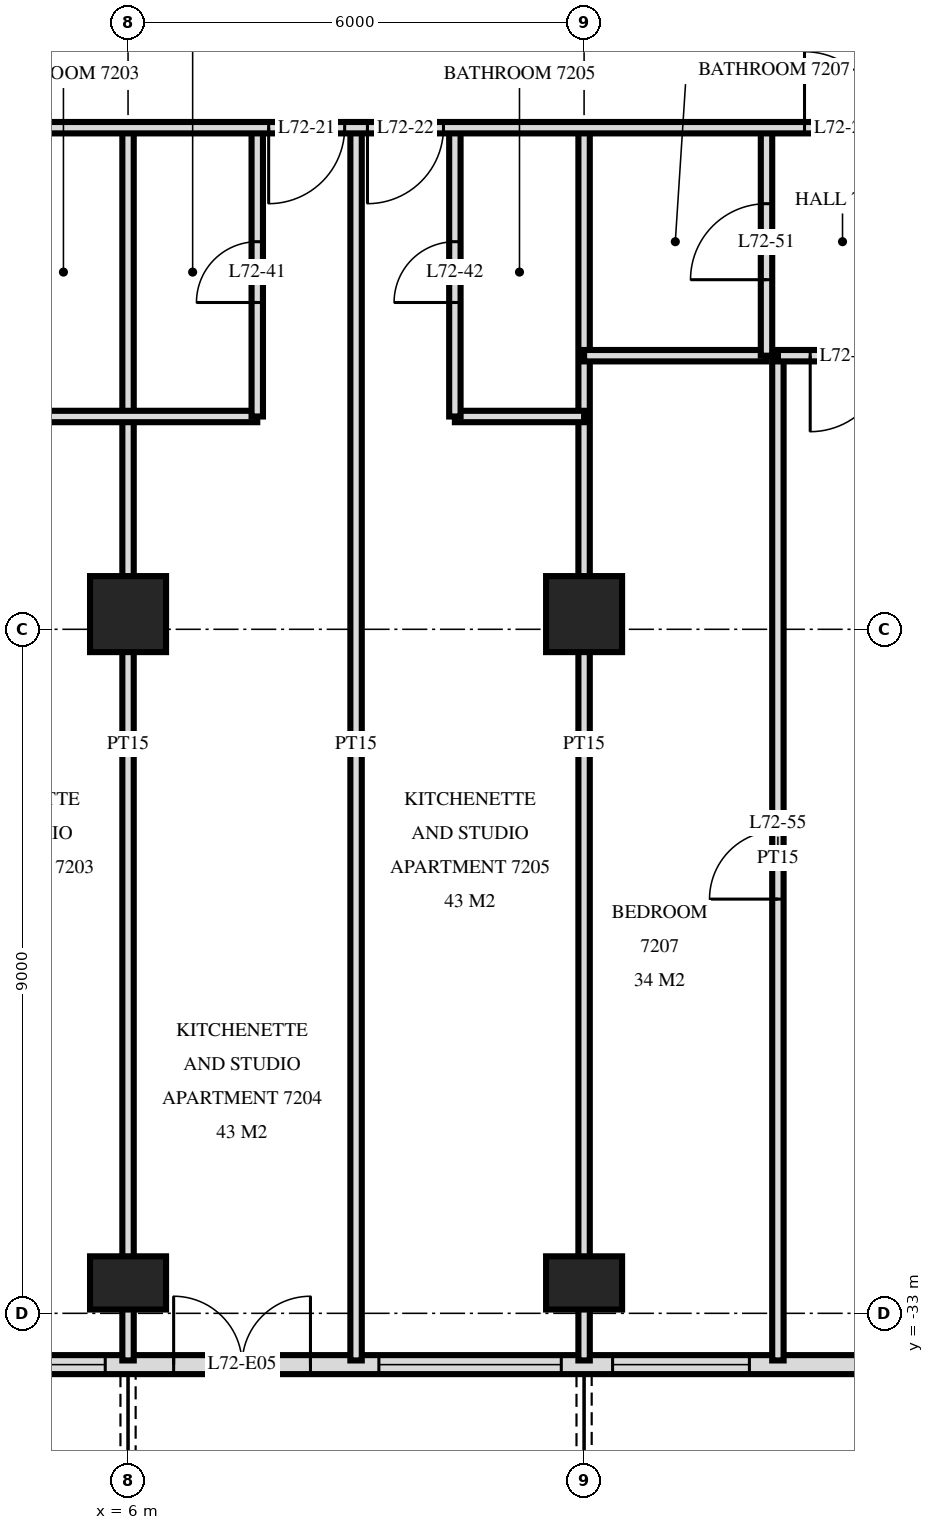
"""IFC4 building model, lengths in metres.
Left out: names, types, materials, properties, quantities, classifications, styles, units other than length and angle.
Written with IfcOpenShell. Run it as: python <this file> out.ifc"""

import sys

from ifc_helpers import new_model, si_unit, direction, frame, frame_2d, origin, origin_2d, place, context, subcontext, project, spatial, rectangle, extrude, element, fill, save


model = new_model("IFC4")
c1 = context("Model", 3, precision=1e-05, world=origin(), true_north=direction((0.0, 1.0)))
c2 = subcontext(c1, "Body", "Model", "MODEL_VIEW")
j1 = project(units=[si_unit("LENGTHUNIT", "METRE"), si_unit("PLANEANGLEUNIT", "RADIAN")], contexts=[c1])
p1 = place(None, origin())
s1 = spatial("IfcSite", under=j1, at=p1, CompositionType="ELEMENT")
p2 = place(p1, origin())
s2 = spatial("IfcBuilding", under=s1, at=p2, CompositionType="ELEMENT")
p3 = place(p2, frame((0.0, 0.0, 273.6)))
s3 = spatial("IfcBuildingStorey", under=s2, at=p3, CompositionType="ELEMENT", Elevation=273.6)
p4 = place(p3, frame((6.0, -32.6, 0.0), z_axis=(0.0, 0.0, 1.0), x_axis=(1.0, 0.0, 0.0)))
e1 = element("IfcColumn", 1, at=p4, inside=s3, PredefinedType="COLUMN", context=c2, shape_type="SweptSolid", body=[
    extrude(rectangle(XDim=1.0, YDim=0.7, at=origin_2d()), origin(), (0.0, 0.0, 1.0), 3.5),
])
p5 = place(p3, frame((6.0, -23.8, 0.0), z_axis=(0.0, 0.0, 1.0), x_axis=(1.0, 0.0, 0.0)))
e2 = element("IfcColumn", 2, at=p5, inside=s3, PredefinedType="COLUMN", context=c2, shape_type="SweptSolid", body=[
    extrude(rectangle(XDim=1.0, YDim=1.0, at=origin_2d()), origin(), (0.0, 0.0, 1.0), 3.5),
])
p6 = place(p3, frame((12.0, -32.6, 0.0), z_axis=(0.0, 0.0, 1.0), x_axis=(1.0, 0.0, 0.0)))
e3 = element("IfcColumn", 3, at=p6, inside=s3, PredefinedType="COLUMN", context=c2, shape_type="SweptSolid", body=[
    extrude(rectangle(XDim=1.0, YDim=0.7, at=origin_2d()), origin(), (0.0, 0.0, 1.0), 3.5),
])
p7 = place(p3, frame((12.0, -23.8, 0.0), z_axis=(0.0, 0.0, 1.0), x_axis=(1.0, 0.0, 0.0)))
e4 = element("IfcColumn", 4, at=p7, inside=s3, PredefinedType="COLUMN", context=c2, shape_type="SweptSolid", body=[
    extrude(rectangle(XDim=1.0, YDim=1.0, at=origin_2d()), origin(), (0.0, 0.0, 1.0), 3.5),
])
p8 = place(p3, frame((-18.575, -33.675, 0.0), z_axis=(0.0, 0.0, 1.0), x_axis=(1.0, 0.0, 0.0)))
e5 = element("IfcWall", 5, at=p8, inside=s3, PredefinedType="SOLIDWALL", context=c2, shape_type="SweptSolid", body=[
    extrude(rectangle(XDim=37.151, YDim=0.25, at=frame_2d((18.575, 0.0))), origin(), (0.0, 0.0, 1.0), 3.22),
])
p9 = place(p8, frame((4.175, 0.0, 0.0)))
e6 = element("IfcOpeningElement", 6, at=p9, cuts=e5, PredefinedType="OPENING", context=c2, shape_type="SweptSolid", body=[
    extrude(rectangle(XDim=1.8, YDim=2.4, at=frame_2d((0.9, 1.2))), frame((0.0, 0.135, 0.0), z_axis=(0.0, -1.0, 0.0), x_axis=(1.0, 0.0, 0.0)), (0.0, 0.0, 1.0), 0.27),
])
p10 = place(p8, frame((7.512, 0.0, 0.0)))
e7 = element("IfcOpeningElement", 7, at=p10, cuts=e5, PredefinedType="OPENING", context=c2, shape_type="SweptSolid", body=[
    extrude(rectangle(XDim=1.8, YDim=2.4, at=frame_2d((0.9, 1.2))), frame((0.0, 0.135, 0.0), z_axis=(0.0, -1.0, 0.0), x_axis=(1.0, 0.0, 0.0)), (0.0, 0.0, 1.0), 0.27),
])
p11 = place(p8, frame((10.287, 0.0, 0.9)))
e8 = element("IfcOpeningElement", 8, at=p11, cuts=e5, PredefinedType="OPENING", context=c2, shape_type="SweptSolid", body=[
    extrude(rectangle(XDim=1.8, YDim=1.5, at=frame_2d((0.9, 0.75))), frame((0.0, 0.135, 0.0), z_axis=(0.0, -1.0, 0.0), x_axis=(1.0, 0.0, 0.0)), (0.0, 0.0, 1.0), 0.27),
])
p12 = place(p8, frame((12.875, 0.0, 0.9)))
e9 = element("IfcOpeningElement", 9, at=p12, cuts=e5, PredefinedType="OPENING", context=c2, shape_type="SweptSolid", body=[
    extrude(rectangle(XDim=2.4, YDim=1.5, at=frame_2d((1.2, 0.75))), frame((0.0, 0.135, 0.0), z_axis=(0.0, -1.0, 0.0), x_axis=(1.0, 0.0, 0.0)), (0.0, 0.0, 1.0), 0.27),
])
p13 = place(p8, frame((16.175, 0.0, 0.0)))
e10 = element("IfcOpeningElement", 10, at=p13, cuts=e5, PredefinedType="OPENING", context=c2, shape_type="SweptSolid", body=[
    extrude(rectangle(XDim=1.8, YDim=2.4, at=frame_2d((0.9, 1.2))), frame((0.0, 0.135, 0.0), z_axis=(0.0, -1.0, 0.0), x_axis=(1.0, 0.0, 0.0)), (0.0, 0.0, 1.0), 0.27),
])
p14 = place(p8, frame((19.175, 0.0, 0.0)))
e11 = element("IfcOpeningElement", 11, at=p14, cuts=e5, PredefinedType="OPENING", context=c2, shape_type="SweptSolid", body=[
    extrude(rectangle(XDim=1.8, YDim=2.4, at=frame_2d((0.9, 1.2))), frame((0.0, 0.135, 0.0), z_axis=(0.0, -1.0, 0.0), x_axis=(1.0, 0.0, 0.0)), (0.0, 0.0, 1.0), 0.27),
])
p15 = place(p8, frame((21.875, 0.0, 0.9)))
e12 = element("IfcOpeningElement", 12, at=p15, cuts=e5, PredefinedType="OPENING", context=c2, shape_type="SweptSolid", body=[
    extrude(rectangle(XDim=2.4, YDim=1.5, at=frame_2d((1.2, 0.75))), frame((0.0, 0.135, 0.0), z_axis=(0.0, -1.0, 0.0), x_axis=(1.0, 0.0, 0.0)), (0.0, 0.0, 1.0), 0.27),
])
p16 = place(p8, frame((25.175, 0.0, 0.0)))
e13 = element("IfcOpeningElement", 13, at=p16, cuts=e5, PredefinedType="OPENING", context=c2, shape_type="SweptSolid", body=[
    extrude(rectangle(XDim=1.8, YDim=2.4, at=frame_2d((0.9, 1.2))), frame((0.0, 0.135, 0.0), z_axis=(0.0, -1.0, 0.0), x_axis=(1.0, 0.0, 0.0)), (0.0, 0.0, 1.0), 0.27),
])
p17 = place(p8, frame((27.875, 0.0, 0.9)))
e14 = element("IfcOpeningElement", 14, at=p17, cuts=e5, PredefinedType="OPENING", context=c2, shape_type="SweptSolid", body=[
    extrude(rectangle(XDim=2.4, YDim=1.5, at=frame_2d((1.2, 0.75))), frame((0.0, 0.135, 0.0), z_axis=(0.0, -1.0, 0.0), x_axis=(1.0, 0.0, 0.0)), (0.0, 0.0, 1.0), 0.27),
])
p18 = place(p8, frame((30.95, 0.0, 0.9)))
e15 = element("IfcOpeningElement", 15, at=p18, cuts=e5, PredefinedType="OPENING", context=c2, shape_type="SweptSolid", body=[
    extrude(rectangle(XDim=1.8, YDim=1.5, at=frame_2d((0.9, 0.75))), frame((0.0, 0.135, 0.0), z_axis=(0.0, -1.0, 0.0), x_axis=(1.0, 0.0, 0.0)), (0.0, 0.0, 1.0), 0.27),
])
p19 = place(p8, frame((34.175, 0.0, 0.0)))
e16 = element("IfcOpeningElement", 16, at=p19, cuts=e5, PredefinedType="OPENING", context=c2, shape_type="SweptSolid", body=[
    extrude(rectangle(XDim=1.8, YDim=2.4, at=frame_2d((0.9, 1.2))), frame((0.0, 0.135, 0.0), z_axis=(0.0, -1.0, 0.0), x_axis=(1.0, 0.0, 0.0)), (0.0, 0.0, 1.0), 0.27),
])
p20 = place(p3, frame((14.55, -33.62, 0.0), z_axis=(0.0, 0.0, 1.0), x_axis=(0.0, 1.0, 0.0)))
e17 = element("IfcWall", 17, at=p20, inside=s3, PredefinedType="PARTITIONING", context=c2, shape_type="SweptSolid", body=[
    extrude(rectangle(XDim=13.22, YDim=0.15, at=frame_2d((6.61, 0.0))), origin(), (0.0, 0.0, 1.0), 3.22),
])
p21 = place(p20, frame((6.07, 0.0, 0.0)))
e18 = element("IfcOpeningElement", 18, at=p21, cuts=e17, PredefinedType="OPENING", context=c2, shape_type="SweptSolid", body=[
    extrude(rectangle(XDim=0.9, YDim=2.1, at=frame_2d((0.45, 1.05))), frame((0.0, 0.085, 0.0), z_axis=(0.0, -1.0, 0.0), x_axis=(1.0, 0.0, 0.0)), (0.0, 0.0, 1.0), 0.17),
])
p22 = place(p3, frame((14.4, -20.4, 0.0), z_axis=(0.0, 0.0, 1.0), x_axis=(0.0, 1.0, 0.0)))
e19 = element("IfcWall", 19, at=p22, inside=s3, PredefinedType="PARTITIONING", context=c2, shape_type="SweptSolid", body=[
    extrude(rectangle(XDim=3.0, YDim=0.15, at=frame_2d((1.5, 0.0))), origin(), (0.0, 0.0, 1.0), 3.22),
])
p23 = place(p22, frame((1.0, 0.0, 0.0)))
e20 = element("IfcOpeningElement", 20, at=p23, cuts=e19, PredefinedType="OPENING", context=c2, shape_type="SweptSolid", body=[
    extrude(rectangle(XDim=1.0, YDim=2.1, at=frame_2d((0.5, 1.05))), frame((0.0, 0.085, 0.0), z_axis=(0.0, -1.0, 0.0), x_axis=(1.0, 0.0, 0.0)), (0.0, 0.0, 1.0), 0.17),
])
p24 = place(p3, frame((12.0, -33.62, 0.0), z_axis=(0.0, 0.0, 1.0), x_axis=(0.0, 1.0, 0.0)))
e21 = element("IfcWall", 21, at=p24, inside=s3, PredefinedType="PARTITIONING", context=c2, shape_type="SweptSolid", body=[
    extrude(rectangle(XDim=16.22, YDim=0.15, at=frame_2d((8.11, 0.0))), origin(), (0.0, 0.0, 1.0), 3.22),
])
p25 = place(p3, frame((10.3, -21.2, 0.0), z_axis=(0.0, 0.0, 1.0), x_axis=(0.0, 1.0, 0.0)))
e22 = element("IfcWall", 22, at=p25, inside=s3, PredefinedType="PARTITIONING", context=c2, shape_type="SweptSolid", body=[
    extrude(rectangle(XDim=3.8, YDim=0.15, at=frame_2d((1.9, 0.0))), origin(), (0.0, 0.0, 1.0), 3.22),
])
p26 = place(p25, frame((1.5, 0.0, 0.0)))
e23 = element("IfcOpeningElement", 23, at=p26, cuts=e22, PredefinedType="OPENING", context=c2, shape_type="SweptSolid", body=[
    extrude(rectangle(XDim=0.8, YDim=2.1, at=frame_2d((0.4, 1.05))), frame((0.0, 0.085, 0.0), z_axis=(0.0, -1.0, 0.0), x_axis=(1.0, 0.0, 0.0)), (0.0, 0.0, 1.0), 0.17),
])
p27 = place(p3, frame((9.0, -33.62, 0.0), z_axis=(0.0, 0.0, 1.0), x_axis=(0.0, 1.0, 0.0)))
e24 = element("IfcWall", 24, at=p27, inside=s3, PredefinedType="PARTITIONING", context=c2, shape_type="SweptSolid", body=[
    extrude(rectangle(XDim=16.22, YDim=0.15, at=frame_2d((8.11, 0.0))), origin(), (0.0, 0.0, 1.0), 3.22),
])
p28 = place(p3, frame((7.7, -21.2, 0.0), z_axis=(0.0, 0.0, 1.0), x_axis=(0.0, 1.0, 0.0)))
e25 = element("IfcWall", 25, at=p28, inside=s3, PredefinedType="PARTITIONING", context=c2, shape_type="SweptSolid", body=[
    extrude(rectangle(XDim=3.8, YDim=0.15, at=frame_2d((1.9, 0.0))), origin(), (0.0, 0.0, 1.0), 3.22),
])
p29 = place(p28, frame((1.5, 0.0, 0.0)))
e26 = element("IfcOpeningElement", 26, at=p29, cuts=e25, PredefinedType="OPENING", context=c2, shape_type="SweptSolid", body=[
    extrude(rectangle(XDim=0.8, YDim=2.1, at=frame_2d((0.4, 1.05))), frame((0.0, 0.085, 0.0), z_axis=(0.0, -1.0, 0.0), x_axis=(1.0, 0.0, 0.0)), (0.0, 0.0, 1.0), 0.17),
])
p30 = place(p3, frame((6.0, -33.62, 0.0), z_axis=(0.0, 0.0, 1.0), x_axis=(0.0, 1.0, 0.0)))
e27 = element("IfcWall", 27, at=p30, inside=s3, PredefinedType="PARTITIONING", context=c2, shape_type="SweptSolid", body=[
    extrude(rectangle(XDim=16.22, YDim=0.15, at=frame_2d((8.11, 0.0))), origin(), (0.0, 0.0, 1.0), 3.22),
])
p31 = place(p3, frame((4.3, -21.2, 0.0), z_axis=(0.0, 0.0, 1.0), x_axis=(1.0, 0.0, 0.0)))
e28 = element("IfcWall", 28, at=p31, inside=s3, PredefinedType="PARTITIONING", context=c2, shape_type="SweptSolid", body=[
    extrude(rectangle(XDim=3.4, YDim=0.15, at=frame_2d((1.7, 0.0))), origin(), (0.0, 0.0, 1.0), 3.22),
])
p32 = place(p3, frame((10.3, -21.2, 0.0), z_axis=(0.0, 0.0, 1.0), x_axis=(1.0, 0.0, 0.0)))
e29 = element("IfcWall", 29, at=p32, inside=s3, PredefinedType="PARTITIONING", context=c2, shape_type="SweptSolid", body=[
    extrude(rectangle(XDim=1.7, YDim=0.15, at=frame_2d((0.85, 0.0))), origin(), (0.0, 0.0, 1.0), 3.22),
])
p33 = place(p3, frame((14.55, -20.4, 0.0), z_axis=(0.0, 0.0, 1.0), x_axis=(1.0, 0.0, 0.0)))
e30 = element("IfcWall", 30, at=p33, inside=s3, PredefinedType="PARTITIONING", context=c2, shape_type="SweptSolid", body=[
    extrude(rectangle(XDim=1.85, YDim=0.15, at=frame_2d((0.925, 0.0))), origin(), (0.0, 0.0, 1.0), 3.22),
])
p34 = place(p33, frame((0.425, 0.0, 0.0)))
e31 = element("IfcOpeningElement", 31, at=p34, cuts=e30, PredefinedType="OPENING", context=c2, shape_type="SweptSolid", body=[
    extrude(rectangle(XDim=1.0, YDim=2.1, at=frame_2d((0.5, 1.05))), frame((0.0, 0.085, 0.0), z_axis=(0.0, -1.0, 0.0), x_axis=(1.0, 0.0, 0.0)), (0.0, 0.0, 1.0), 0.17),
])
p35 = place(p3, frame((12.0, -20.4, 0.0), z_axis=(0.0, 0.0, 1.0), x_axis=(1.0, 0.0, 0.0)))
e32 = element("IfcWall", 32, at=p35, inside=s3, PredefinedType="PARTITIONING", context=c2, shape_type="SweptSolid", body=[
    extrude(rectangle(XDim=2.4, YDim=0.15, at=frame_2d((1.2, 0.0))), origin(), (0.0, 0.0, 1.0), 3.22),
])
p36 = place(p3, frame((-22.92, -17.4, 0.0), z_axis=(0.0, 0.0, 1.0), x_axis=(1.0, 0.0, 0.0)))
e33 = element("IfcWall", 33, at=p36, inside=s3, PredefinedType="PARTITIONING", context=c2, shape_type="SweptSolid", body=[
    extrude(rectangle(XDim=45.84, YDim=0.15, at=frame_2d((22.92, 0.0))), origin(), (0.0, 0.0, 1.0), 3.22),
])
p37 = place(p36, frame((21.67, 0.0, 0.0)))
e34 = element("IfcOpeningElement", 34, at=p37, cuts=e33, PredefinedType="OPENING", context=c2, shape_type="SweptSolid", body=[
    extrude(rectangle(XDim=1.0, YDim=2.1, at=frame_2d((0.5, 1.05))), frame((0.0, 0.085, 0.0), z_axis=(0.0, -1.0, 0.0), x_axis=(1.0, 0.0, 0.0)), (0.0, 0.0, 1.0), 0.17),
])
p38 = place(p36, frame((24.77, 0.0, 0.0)))
e35 = element("IfcOpeningElement", 35, at=p38, cuts=e33, PredefinedType="OPENING", context=c2, shape_type="SweptSolid", body=[
    extrude(rectangle(XDim=1.0, YDim=2.1, at=frame_2d((0.5, 1.05))), frame((0.0, 0.085, 0.0), z_axis=(0.0, -1.0, 0.0), x_axis=(1.0, 0.0, 0.0)), (0.0, 0.0, 1.0), 0.17),
])
p39 = place(p36, frame((26.07, 0.0, 0.0)))
e36 = element("IfcOpeningElement", 36, at=p39, cuts=e33, PredefinedType="OPENING", context=c2, shape_type="SweptSolid", body=[
    extrude(rectangle(XDim=1.0, YDim=2.1, at=frame_2d((0.5, 1.05))), frame((0.0, 0.085, 0.0), z_axis=(0.0, -1.0, 0.0), x_axis=(1.0, 0.0, 0.0)), (0.0, 0.0, 1.0), 0.17),
])
p40 = place(p36, frame((30.77, 0.0, 0.0)))
e37 = element("IfcOpeningElement", 37, at=p40, cuts=e33, PredefinedType="OPENING", context=c2, shape_type="SweptSolid", body=[
    extrude(rectangle(XDim=1.0, YDim=2.1, at=frame_2d((0.5, 1.05))), frame((0.0, 0.085, 0.0), z_axis=(0.0, -1.0, 0.0), x_axis=(1.0, 0.0, 0.0)), (0.0, 0.0, 1.0), 0.17),
])
p41 = place(p36, frame((32.07, 0.0, 0.0)))
e38 = element("IfcOpeningElement", 38, at=p41, cuts=e33, PredefinedType="OPENING", context=c2, shape_type="SweptSolid", body=[
    extrude(rectangle(XDim=1.0, YDim=2.1, at=frame_2d((0.5, 1.05))), frame((0.0, 0.085, 0.0), z_axis=(0.0, -1.0, 0.0), x_axis=(1.0, 0.0, 0.0)), (0.0, 0.0, 1.0), 0.17),
])
p42 = place(p36, frame((9.42, 0.0, 0.0)))
e39 = element("IfcOpeningElement", 39, at=p42, cuts=e33, PredefinedType="OPENING", context=c2, shape_type="SweptSolid", body=[
    extrude(rectangle(XDim=1.0, YDim=2.1, at=frame_2d((0.5, 1.05))), frame((0.0, 0.085, 0.0), z_axis=(0.0, -1.0, 0.0), x_axis=(1.0, 0.0, 0.0)), (0.0, 0.0, 1.0), 0.17),
])
p43 = place(p36, frame((2.67, 0.0, 0.0)))
e40 = element("IfcOpeningElement", 40, at=p43, cuts=e33, PredefinedType="OPENING", context=c2, shape_type="SweptSolid", body=[
    extrude(rectangle(XDim=1.0, YDim=2.1, at=frame_2d((0.5, 1.05))), frame((0.0, 0.085, 0.0), z_axis=(0.0, -1.0, 0.0), x_axis=(1.0, 0.0, 0.0)), (0.0, 0.0, 1.0), 0.17),
])
p44 = place(p36, frame((37.82, 0.0, 0.0)))
e41 = element("IfcOpeningElement", 41, at=p44, cuts=e33, PredefinedType="OPENING", context=c2, shape_type="SweptSolid", body=[
    extrude(rectangle(XDim=1.0, YDim=2.1, at=frame_2d((0.5, 1.05))), frame((0.0, 0.085, 0.0), z_axis=(0.0, -1.0, 0.0), x_axis=(1.0, 0.0, 0.0)), (0.0, 0.0, 1.0), 0.17),
])
p45 = place(p15, origin())
e42 = element("IfcWindow", 42, at=p45, inside=s3, PartitioningType="SINGLE_PANEL", PredefinedType="WINDOW", context=c2, shape_type="SweptSolid", body=[
    extrude(rectangle(XDim=2.4, YDim=1.5, at=frame_2d((1.2, 0.75))), frame((0.0, 0.03, 0.0), z_axis=(0.0, -1.0, 0.0), x_axis=(1.0, 0.0, 0.0)), (0.0, 0.0, 1.0), 0.06),
])
fill(e12, e42)
p46 = place(p16, origin())
e43 = element("IfcDoor", 43, at=p46, inside=s3, OperationType="DOUBLE_DOOR_SINGLE_SWING", PredefinedType="DOOR", context=c2, shape_type="SweptSolid", body=[
    extrude(rectangle(XDim=1.8, YDim=2.4, at=frame_2d((0.9, 1.2))), frame((0.0, 0.025, 0.0), z_axis=(0.0, -1.0, 0.0), x_axis=(1.0, 0.0, 0.0)), (0.0, 0.0, 1.0), 0.05),
])
fill(e13, e43)
p47 = place(p17, origin())
e44 = element("IfcWindow", 44, at=p47, inside=s3, PartitioningType="SINGLE_PANEL", PredefinedType="WINDOW", context=c2, shape_type="SweptSolid", body=[
    extrude(rectangle(XDim=2.4, YDim=1.5, at=frame_2d((1.2, 0.75))), frame((0.0, 0.03, 0.0), z_axis=(0.0, -1.0, 0.0), x_axis=(1.0, 0.0, 0.0)), (0.0, 0.0, 1.0), 0.06),
])
fill(e14, e44)
p48 = place(p18, origin())
e45 = element("IfcWindow", 45, at=p48, inside=s3, PartitioningType="SINGLE_PANEL", PredefinedType="WINDOW", context=c2, shape_type="SweptSolid", body=[
    extrude(rectangle(XDim=1.8, YDim=1.5, at=frame_2d((0.9, 0.75))), frame((0.0, 0.03, 0.0), z_axis=(0.0, -1.0, 0.0), x_axis=(1.0, 0.0, 0.0)), (0.0, 0.0, 1.0), 0.06),
])
fill(e15, e45)
p49 = place(p40, frame((0.5, 0.0, 0.0), z_axis=(0.0, 0.0, 1.0), x_axis=(-1.0, 0.0, 0.0)))
e46 = element("IfcDoor", 46, at=p49, inside=s3, OperationType="SINGLE_SWING_LEFT", PredefinedType="DOOR", context=c2, shape_type="SweptSolid", body=[
    extrude(rectangle(XDim=1.0, YDim=2.1, at=frame_2d((0.0, 1.05))), frame((0.0, -0.025, 0.0), z_axis=(0.0, 1.0, 0.0), x_axis=(-1.0, 0.0, 0.0)), (0.0, 0.0, 1.0), 0.05),
])
fill(e37, e46)
p50 = place(p41, frame((0.5, 0.0, 0.0), z_axis=(0.0, 0.0, 1.0), x_axis=(-1.0, 0.0, 0.0)))
e47 = element("IfcDoor", 47, at=p50, inside=s3, OperationType="SINGLE_SWING_LEFT", PredefinedType="DOOR", context=c2, shape_type="SweptSolid", body=[
    extrude(rectangle(XDim=1.0, YDim=2.1, at=frame_2d((0.0, 1.05))), frame((0.0, -0.025, 0.0), z_axis=(0.0, 1.0, 0.0), x_axis=(-1.0, 0.0, 0.0)), (0.0, 0.0, 1.0), 0.05),
])
fill(e38, e47)
p51 = place(p44, origin())
e48 = element("IfcDoor", 48, at=p51, inside=s3, OperationType="SINGLE_SWING_RIGHT", PredefinedType="DOOR", context=c2, shape_type="SweptSolid", body=[
    extrude(rectangle(XDim=1.0, YDim=2.1, at=frame_2d((0.5, 1.05))), frame((0.0, 0.025, 0.0), z_axis=(0.0, -1.0, 0.0), x_axis=(1.0, 0.0, 0.0)), (0.0, 0.0, 1.0), 0.05),
])
fill(e41, e48)
p52 = place(p29, origin())
e49 = element("IfcDoor", 49, at=p52, inside=s3, OperationType="SINGLE_SWING_RIGHT", PredefinedType="DOOR", context=c2, shape_type="SweptSolid", body=[
    extrude(rectangle(XDim=0.8, YDim=2.1, at=frame_2d((0.4, 1.05))), frame((0.0, 0.025, 0.0), z_axis=(0.0, -1.0, 0.0), x_axis=(1.0, 0.0, 0.0)), (0.0, 0.0, 1.0), 0.05),
])
fill(e26, e49)
p53 = place(p26, origin())
e50 = element("IfcDoor", 50, at=p53, inside=s3, OperationType="SINGLE_SWING_RIGHT", PredefinedType="DOOR", context=c2, shape_type="SweptSolid", body=[
    extrude(rectangle(XDim=0.8, YDim=2.1, at=frame_2d((0.4, 1.05))), frame((0.0, 0.025, 0.0), z_axis=(0.0, -1.0, 0.0), x_axis=(1.0, 0.0, 0.0)), (0.0, 0.0, 1.0), 0.05),
])
fill(e23, e50)
p54 = place(p23, origin())
e51 = element("IfcDoor", 51, at=p54, inside=s3, OperationType="SINGLE_SWING_RIGHT", PredefinedType="DOOR", context=c2, shape_type="SweptSolid", body=[
    extrude(rectangle(XDim=1.0, YDim=2.1, at=frame_2d((0.5, 1.05))), frame((0.0, 0.025, 0.0), z_axis=(0.0, -1.0, 0.0), x_axis=(1.0, 0.0, 0.0)), (0.0, 0.0, 1.0), 0.05),
])
fill(e20, e51)
p55 = place(p34, frame((0.5, 0.0, 0.0), z_axis=(0.0, 0.0, 1.0), x_axis=(-1.0, 0.0, 0.0)))
e52 = element("IfcDoor", 52, at=p55, inside=s3, OperationType="SINGLE_SWING_LEFT", PredefinedType="DOOR", context=c2, shape_type="SweptSolid", body=[
    extrude(rectangle(XDim=1.0, YDim=2.1, at=frame_2d((0.0, 1.05))), frame((0.0, -0.025, 0.0), z_axis=(0.0, 1.0, 0.0), x_axis=(-1.0, 0.0, 0.0)), (0.0, 0.0, 1.0), 0.05),
])
fill(e31, e52)
p56 = place(p21, origin())
e53 = element("IfcDoor", 53, at=p56, inside=s3, OperationType="SINGLE_SWING_RIGHT", PredefinedType="DOOR", context=c2, shape_type="SweptSolid", body=[
    extrude(rectangle(XDim=0.9, YDim=2.1, at=frame_2d((0.45, 1.05))), frame((0.0, 0.025, 0.0), z_axis=(0.0, -1.0, 0.0), x_axis=(1.0, 0.0, 0.0)), (0.0, 0.0, 1.0), 0.05),
])
fill(e18, e53)
save(model, sys.argv[1])
